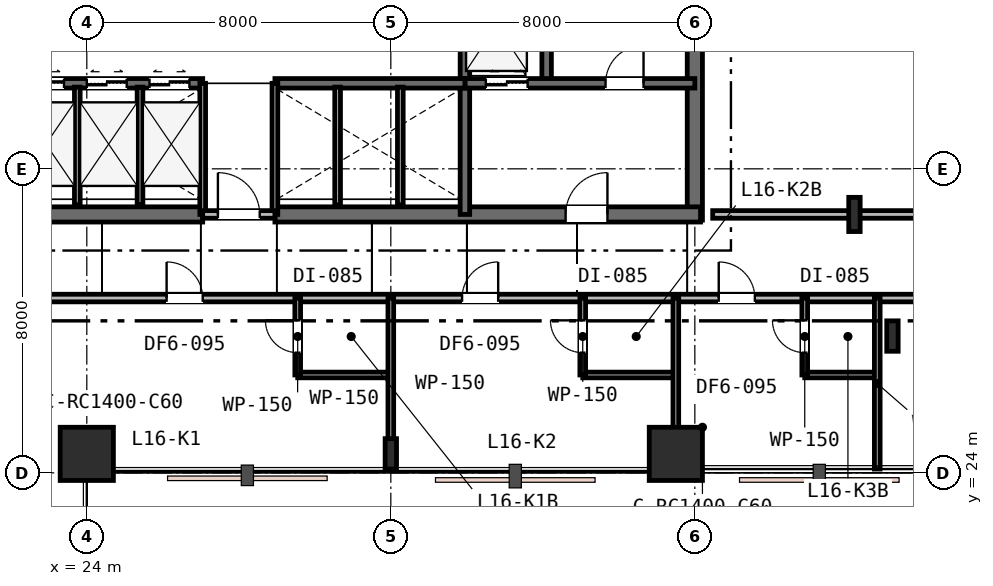
"""IFC4 building model, lengths in metres.
Left out: names, types, materials, properties, quantities, classifications, styles, units other than length and angle.
Written with IfcOpenShell. Run it as: python <this file> out.ifc"""

import sys

from ifc_helpers import new_model, si_unit, direction, frame, frame_2d, origin, origin_2d, place, context, subcontext, project, spatial, rectangle, i_section, extrude, element, fill, save


model = new_model("IFC4")
c1 = context("Model", 3, precision=1e-05, world=origin(), true_north=direction((0.0, 1.0)))
c2 = subcontext(c1, "Body", "Model", "MODEL_VIEW")
j1 = project(units=[si_unit("LENGTHUNIT", "METRE"), si_unit("PLANEANGLEUNIT", "RADIAN")], contexts=[c1])
p1 = place(None, origin())
s1 = spatial("IfcSite", under=j1, at=p1, CompositionType="ELEMENT")
p2 = place(p1, origin())
s2 = spatial("IfcBuilding", under=s1, at=p2, CompositionType="ELEMENT")
p3 = place(p2, frame((0.0, 0.0, 65.4)))
s3 = spatial("IfcBuildingStorey", under=s2, at=p3, CompositionType="ELEMENT", Elevation=65.4)
p4 = place(p3, frame((40.0, 30.65, 0.0), z_axis=(0.0, 0.0, 1.0), x_axis=(0.0, 1.0, 0.0)))
e1 = element("IfcWall", 1, at=p4, inside=s3, PredefinedType="SHEAR", context=c2, shape_type="SweptSolid", body=[
    extrude(rectangle(XDim=12.3, YDim=0.4, at=frame_2d((6.15, 0.0))), origin(), (0.0, 0.0, 1.0), 3.6),
])
p5 = place(p3, frame((15.85, 30.8, 0.0), z_axis=(0.0, 0.0, 1.0), x_axis=(1.0, 0.0, 0.0)))
e2 = element("IfcWall", 2, at=p5, inside=s3, PredefinedType="SHEAR", context=c2, shape_type="SweptSolid", body=[
    extrude(rectangle(XDim=11.2, YDim=0.4, at=frame_2d((5.6, 0.0))), origin(), (0.0, 0.0, 1.0), 3.6),
])
p6 = place(p5, frame((2.45, 0.0, 0.0)))
e3 = element("IfcOpeningElement", 3, at=p6, cuts=e2, PredefinedType="OPENING", context=c2, shape_type="SweptSolid", body=[
    extrude(rectangle(XDim=1.1, YDim=2.15, at=frame_2d((0.55, 1.075))), frame((0.0, 0.21, 0.0), z_axis=(0.0, -1.0, 0.0), x_axis=(1.0, 0.0, 0.0)), (0.0, 0.0, 1.0), 0.42),
])
p7 = place(p3, frame((28.95, 30.8, 0.0), z_axis=(0.0, 0.0, 1.0), x_axis=(1.0, 0.0, 0.0)))
e4 = element("IfcWall", 4, at=p7, inside=s3, PredefinedType="SHEAR", context=c2, shape_type="SweptSolid", body=[
    extrude(rectangle(XDim=11.2, YDim=0.4, at=frame_2d((5.6, 0.0))), origin(), (0.0, 0.0, 1.0), 3.6),
])
p8 = place(p7, frame((7.65, 0.0, 0.0)))
e5 = element("IfcOpeningElement", 5, at=p8, cuts=e4, PredefinedType="OPENING", context=c2, shape_type="SweptSolid", body=[
    extrude(rectangle(XDim=1.1, YDim=2.15, at=frame_2d((0.55, 1.075))), frame((0.0, 0.21, 0.0), z_axis=(0.0, -1.0, 0.0), x_axis=(1.0, 0.0, 0.0)), (0.0, 0.0, 1.0), 0.42),
])
p9 = place(p3, frame((36.1, 34.25, 0.0), z_axis=(0.0, 0.0, 1.0), x_axis=(0.0, 1.0, 0.0)))
e6 = element("IfcWall", 6, at=p9, inside=s3, PredefinedType="SHEAR", context=c2, shape_type="SweptSolid", body=[
    extrude(rectangle(XDim=8.65, YDim=0.25, at=frame_2d((4.325, 0.0))), origin(), (0.0, 0.0, 1.0), 3.6),
])
p10 = place(p3, frame((33.95, 30.8, 0.0), z_axis=(0.0, 0.0, 1.0), x_axis=(0.0, 1.0, 0.0)))
e7 = element("IfcWall", 7, at=p10, inside=s3, PredefinedType="SHEAR", context=c2, shape_type="SweptSolid", body=[
    extrude(rectangle(XDim=6.45, YDim=0.25, at=frame_2d((3.225, 0.0))), origin(), (0.0, 0.0, 1.0), 3.6),
])
p11 = place(p3, frame((33.95, 34.25, 0.0), z_axis=(0.0, 0.0, 1.0), x_axis=(1.0, 0.0, 0.0)))
e8 = element("IfcWall", 8, at=p11, inside=s3, PredefinedType="SHEAR", context=c2, shape_type="SweptSolid", body=[
    extrude(rectangle(XDim=6.05, YDim=0.25, at=frame_2d((3.025, 0.0))), origin(), (0.0, 0.0, 1.0), 3.6),
])
p12 = place(p11, frame((3.7, 0.0, 0.0)))
e9 = element("IfcOpeningElement", 9, at=p12, cuts=e8, PredefinedType="OPENING", context=c2, shape_type="SweptSolid", body=[
    extrude(rectangle(XDim=1.0, YDim=2.15, at=frame_2d((0.5, 1.075))), frame((0.0, 0.135, 0.0), z_axis=(0.0, -1.0, 0.0), x_axis=(1.0, 0.0, 0.0)), (0.0, 0.0, 1.0), 0.27),
])
p13 = place(p11, frame((0.55, 0.0, 0.0)))
e10 = element("IfcOpeningElement", 10, at=p13, cuts=e8, PredefinedType="OPENING", context=c2, shape_type="SweptSolid", body=[
    extrude(rectangle(XDim=1.1, YDim=2.15, at=frame_2d((0.55, 1.075))), frame((0.0, 0.135, 0.0), z_axis=(0.0, -1.0, 0.0), x_axis=(1.0, 0.0, 0.0)), (0.0, 0.0, 1.0), 0.27),
])
p14 = place(p3, frame((22.05, 34.25, 0.0), z_axis=(0.0, 0.0, 1.0), x_axis=(1.0, 0.0, 0.0)))
e11 = element("IfcWall", 11, at=p14, inside=s3, PredefinedType="SHEAR", context=c2, shape_type="SweptSolid", body=[
    extrude(rectangle(XDim=5.0, YDim=0.25, at=frame_2d((2.5, 0.0))), origin(), (0.0, 0.0, 1.0), 3.6),
])
p15 = place(p14, frame((0.3, 0.0, 0.0)))
e12 = element("IfcOpeningElement", 12, at=p15, cuts=e11, PredefinedType="OPENING", context=c2, shape_type="SweptSolid", body=[
    extrude(rectangle(XDim=1.05, YDim=2.15, at=frame_2d((0.525, 1.075))), frame((0.0, 0.135, 0.0), z_axis=(0.0, -1.0, 0.0), x_axis=(1.0, 0.0, 0.0)), (0.0, 0.0, 1.0), 0.27),
])
p16 = place(p14, frame((1.95, 0.0, 0.0)))
e13 = element("IfcOpeningElement", 13, at=p16, cuts=e11, PredefinedType="OPENING", context=c2, shape_type="SweptSolid", body=[
    extrude(rectangle(XDim=1.05, YDim=2.15, at=frame_2d((0.525, 1.075))), frame((0.0, 0.135, 0.0), z_axis=(0.0, -1.0, 0.0), x_axis=(1.0, 0.0, 0.0)), (0.0, 0.0, 1.0), 0.27),
])
p17 = place(p14, frame((3.6, 0.0, 0.0)))
e14 = element("IfcOpeningElement", 14, at=p17, cuts=e11, PredefinedType="OPENING", context=c2, shape_type="SweptSolid", body=[
    extrude(rectangle(XDim=1.05, YDim=2.15, at=frame_2d((0.525, 1.075))), frame((0.0, 0.135, 0.0), z_axis=(0.0, -1.0, 0.0), x_axis=(1.0, 0.0, 0.0)), (0.0, 0.0, 1.0), 0.27),
])
p18 = place(p3, frame((28.95, 34.25, 0.0), z_axis=(0.0, 0.0, 1.0), x_axis=(1.0, 0.0, 0.0)))
e15 = element("IfcWall", 15, at=p18, inside=s3, PredefinedType="SHEAR", context=c2, shape_type="SweptSolid", body=[
    extrude(rectangle(XDim=5.0, YDim=0.25, at=frame_2d((2.5, 0.0))), origin(), (0.0, 0.0, 1.0), 3.6),
])
p19 = place(p3, frame((24.0, 24.5, 0.0), z_axis=(0.0, 0.0, 1.0), x_axis=(1.0, 0.0, 0.0)))
e16 = element("IfcColumn", 16, at=p19, inside=s3, PredefinedType="COLUMN", context=c2, shape_type="SweptSolid", body=[
    extrude(rectangle(XDim=1.4, YDim=1.4, at=origin_2d()), origin(), (0.0, 0.0, 1.0), 3.6),
])
p20 = place(p3, frame((32.0, 24.5, 0.0), z_axis=(0.0, 0.0, 1.0), x_axis=(1.0, 0.0, 0.0)))
e17 = element("IfcColumn", 17, at=p20, inside=s3, PredefinedType="COLUMN", context=c2, shape_type="SweptSolid", body=[
    extrude(i_section(OverallWidth=0.3, OverallDepth=0.8, WebThickness=0.018, FlangeThickness=0.033, FilletRadius=0.03, at=origin_2d()), origin(), (0.0, 0.0, 1.0), 3.6),
])
p21 = place(p3, frame((39.5, 24.5, 0.0), z_axis=(0.0, 0.0, 1.0), x_axis=(1.0, 0.0, 0.0)))
e18 = element("IfcColumn", 18, at=p21, inside=s3, PredefinedType="COLUMN", context=c2, shape_type="SweptSolid", body=[
    extrude(rectangle(XDim=1.4, YDim=1.4, at=origin_2d()), origin(), (0.0, 0.0, 1.0), 3.6),
])
p22 = place(p3, frame((45.2, 27.6, 0.0), z_axis=(0.0, 0.0, 1.0), x_axis=(1.0, 0.0, 0.0)))
e19 = element("IfcColumn", 19, at=p22, inside=s3, PredefinedType="COLUMN", context=c2, shape_type="SweptSolid", body=[
    extrude(i_section(OverallWidth=0.3, OverallDepth=0.8, WebThickness=0.018, FlangeThickness=0.033, FilletRadius=0.03, at=origin_2d()), origin(), (0.0, 0.0, 1.0), 3.6),
])
p23 = place(p3, frame((44.2, 30.8, 0.0), z_axis=(0.0, 0.0, 1.0), x_axis=(1.0, 0.0, 0.0)))
e20 = element("IfcColumn", 20, at=p23, inside=s3, PredefinedType="COLUMN", context=c2, shape_type="SweptSolid", body=[
    extrude(i_section(OverallWidth=0.3, OverallDepth=0.9, WebThickness=0.018, FlangeThickness=0.035, FilletRadius=0.03, at=origin_2d()), origin(), (0.0, 0.0, 1.0), 3.6),
])
for number, where, z_axis, x_axis in (
    (21, (27.05, 30.8, 0.0), (0.0, 0.0, 1.0), (0.0, 1.0, 0.0)),
    (22, (28.95, 30.8, 0.0), (0.0, 0.0, 1.0), (0.0, 1.0, 0.0)),
):
    element("IfcWall", number, at=place(p3, frame(where, z_axis=z_axis, x_axis=x_axis)), inside=s3, PredefinedType="PLUMBINGWALL", context=c2, shape_type="SweptSolid", body=[
        extrude(rectangle(XDim=3.45, YDim=0.15, at=frame_2d((1.725, 0.0))), origin(), (0.0, 0.0, 1.0), 3.33),
    ])
p24 = place(p3, frame((27.05, 30.8, 0.0), z_axis=(0.0, 0.0, 1.0), x_axis=(1.0, 0.0, 0.0)))
e23 = element("IfcWall", 23, at=p24, inside=s3, PredefinedType="PARTITIONING", context=c2, shape_type="SweptSolid", body=[
    extrude(rectangle(XDim=1.9, YDim=0.2, at=frame_2d((0.95, 0.0))), origin(), (0.0, 0.0, 1.0), 3.33),
])
p25 = place(p24, frame((0.4, 0.0, 0.0)))
e24 = element("IfcOpeningElement", 24, at=p25, cuts=e23, PredefinedType="OPENING", context=c2, shape_type="SweptSolid", body=[
    extrude(rectangle(XDim=1.1, YDim=2.15, at=frame_2d((0.55, 1.075))), frame((0.0, 0.11, 0.0), z_axis=(0.0, -1.0, 0.0), x_axis=(1.0, 0.0, 0.0)), (0.0, 0.0, 1.0), 0.22),
])
for number, where, z_axis, x_axis in (
    (25, (23.75, 31.05, 0.0), (0.0, 0.0, 1.0), (0.0, 1.0, 0.0)),
    (26, (25.4, 31.05, 0.0), (0.0, 0.0, 1.0), (0.0, 1.0, 0.0)),
    (27, (30.6, 31.05, 0.0), (0.0, 0.0, 1.0), (0.0, 1.0, 0.0)),
    (28, (32.25, 31.05, 0.0), (0.0, 0.0, 1.0), (0.0, 1.0, 0.0)),
):
    element("IfcWall", number, at=place(p3, frame(where, z_axis=z_axis, x_axis=x_axis)), inside=s3, PredefinedType="PLUMBINGWALL", context=c2, shape_type="SweptSolid", body=[
        extrude(rectangle(XDim=3.1, YDim=0.15, at=frame_2d((1.55, 0.0))), origin(), (0.0, 0.0, 1.0), 3.33),
    ])
p26 = place(p3, frame((11.8, 28.6, 0.0), z_axis=(0.0, 0.0, 1.0), x_axis=(1.0, 0.0, 0.0)))
e29 = element("IfcWall", 29, at=p26, inside=s3, PredefinedType="PARTITIONING", context=c2, shape_type="SweptSolid", body=[
    extrude(rectangle(XDim=38.6, YDim=0.2, at=frame_2d((19.3, 0.0))), origin(), (0.0, 0.0, 1.0), 2.83),
])
p27 = place(p26, frame((14.3, 0.0, 0.0)))
e30 = element("IfcOpeningElement", 30, at=p27, cuts=e29, PredefinedType="OPENING", context=c2, shape_type="SweptSolid", body=[
    extrude(rectangle(XDim=0.95, YDim=2.15, at=frame_2d((0.475, 1.075))), frame((0.0, 0.11, 0.0), z_axis=(0.0, -1.0, 0.0), x_axis=(1.0, 0.0, 0.0)), (0.0, 0.0, 1.0), 0.22),
])
p28 = place(p26, frame((22.075, 0.0, 0.0)))
e31 = element("IfcOpeningElement", 31, at=p28, cuts=e29, PredefinedType="OPENING", context=c2, shape_type="SweptSolid", body=[
    extrude(rectangle(XDim=0.95, YDim=2.15, at=frame_2d((0.475, 1.075))), frame((0.0, 0.11, 0.0), z_axis=(0.0, -1.0, 0.0), x_axis=(1.0, 0.0, 0.0)), (0.0, 0.0, 1.0), 0.22),
])
p29 = place(p26, frame((28.829, 0.0, 0.0)))
e32 = element("IfcOpeningElement", 32, at=p29, cuts=e29, PredefinedType="OPENING", context=c2, shape_type="SweptSolid", body=[
    extrude(rectangle(XDim=0.95, YDim=2.15, at=frame_2d((0.475, 1.075))), frame((0.0, 0.11, 0.0), z_axis=(0.0, -1.0, 0.0), x_axis=(1.0, 0.0, 0.0)), (0.0, 0.0, 1.0), 0.22),
])
p30 = place(p26, frame((34.669, 0.0, 0.0)))
e33 = element("IfcOpeningElement", 33, at=p30, cuts=e29, PredefinedType="OPENING", context=c2, shape_type="SweptSolid", body=[
    extrude(rectangle(XDim=0.95, YDim=2.15, at=frame_2d((0.475, 1.075))), frame((0.0, 0.11, 0.0), z_axis=(0.0, -1.0, 0.0), x_axis=(1.0, 0.0, 0.0)), (0.0, 0.0, 1.0), 0.22),
])
p31 = place(p3, frame((29.55, 26.576, 0.0), z_axis=(0.0, 0.0, 1.0), x_axis=(1.0, 0.0, 0.0)))
e34 = element("IfcWall", 34, at=p31, inside=s3, PredefinedType="PARTITIONING", context=c2, shape_type="SweptSolid", body=[
    extrude(rectangle(XDim=2.45, YDim=0.15, at=frame_2d((1.225, 0.0))), origin(), (0.0, 0.0, 1.0), 3.33),
])
p32 = place(p3, frame((29.55, 26.576, 0.0), z_axis=(0.0, 0.0, 1.0), x_axis=(0.0, 1.0, 0.0)))
e35 = element("IfcWall", 35, at=p32, inside=s3, PredefinedType="PARTITIONING", context=c2, shape_type="SweptSolid", body=[
    extrude(rectangle(XDim=2.024, YDim=0.15, at=frame_2d((1.012, 0.0))), origin(), (0.0, 0.0, 1.0), 3.33),
])
p33 = place(p32, frame((0.587, 0.0, 0.0)))
e36 = element("IfcOpeningElement", 36, at=p33, cuts=e35, PredefinedType="OPENING", context=c2, shape_type="SweptSolid", body=[
    extrude(rectangle(XDim=0.85, YDim=2.15, at=frame_2d((0.425, 1.075))), frame((0.0, 0.085, 0.0), z_axis=(0.0, -1.0, 0.0), x_axis=(1.0, 0.0, 0.0)), (0.0, 0.0, 1.0), 0.17),
])
p34 = place(p3, frame((32.0, 28.6, 0.0), z_axis=(0.0, 0.0, 1.0), x_axis=(0.0, -1.0, 0.0)))
e37 = element("IfcWall", 37, at=p34, inside=s3, PredefinedType="PARTITIONING", context=c2, shape_type="SweptSolid", body=[
    extrude(rectangle(XDim=4.5, YDim=0.15, at=frame_2d((2.25, 0.0))), origin(), (0.0, 0.0, 1.0), 2.92),
])
p35 = place(p3, frame((37.05, 26.576, 0.0), z_axis=(0.0, 0.0, 1.0), x_axis=(1.0, 0.0, 0.0)))
e38 = element("IfcWall", 38, at=p35, inside=s3, PredefinedType="PARTITIONING", context=c2, shape_type="SweptSolid", body=[
    extrude(rectangle(XDim=2.45, YDim=0.15, at=frame_2d((1.225, 0.0))), origin(), (0.0, 0.0, 1.0), 2.83),
])
p36 = place(p3, frame((37.05, 26.576, 0.0), z_axis=(0.0, 0.0, 1.0), x_axis=(0.0, 1.0, 0.0)))
e39 = element("IfcWall", 39, at=p36, inside=s3, PredefinedType="PARTITIONING", context=c2, shape_type="SweptSolid", body=[
    extrude(rectangle(XDim=2.024, YDim=0.15, at=frame_2d((1.012, 0.0))), origin(), (0.0, 0.0, 1.0), 3.02),
])
p37 = place(p36, frame((0.587, 0.0, 0.0)))
e40 = element("IfcOpeningElement", 40, at=p37, cuts=e39, PredefinedType="OPENING", context=c2, shape_type="SweptSolid", body=[
    extrude(rectangle(XDim=0.85, YDim=2.15, at=frame_2d((0.425, 1.075))), frame((0.0, 0.085, 0.0), z_axis=(0.0, -1.0, 0.0), x_axis=(1.0, 0.0, 0.0)), (0.0, 0.0, 1.0), 0.17),
])
p38 = place(p3, frame((39.5, 28.6, 0.0), z_axis=(0.0, 0.0, 1.0), x_axis=(0.0, -1.0, 0.0)))
e41 = element("IfcWall", 41, at=p38, inside=s3, PredefinedType="PARTITIONING", context=c2, shape_type="SweptSolid", body=[
    extrude(rectangle(XDim=4.5, YDim=0.15, at=frame_2d((2.25, 0.0))), origin(), (0.0, 0.0, 1.0), 2.83),
])
p39 = place(p3, frame((42.892, 26.576, 0.0), z_axis=(0.0, 0.0, 1.0), x_axis=(1.0, 0.0, 0.0)))
e42 = element("IfcWall", 42, at=p39, inside=s3, PredefinedType="PARTITIONING", context=c2, shape_type="SweptSolid", body=[
    extrude(rectangle(XDim=1.908, YDim=0.15, at=frame_2d((0.954, 0.0))), origin(), (0.0, 0.0, 1.0), 3.33),
])
p40 = place(p3, frame((42.892, 26.576, 0.0), z_axis=(0.0, 0.0, 1.0), x_axis=(0.0, 1.0, 0.0)))
e43 = element("IfcWall", 43, at=p40, inside=s3, PredefinedType="PARTITIONING", context=c2, shape_type="SweptSolid", body=[
    extrude(rectangle(XDim=2.024, YDim=0.15, at=frame_2d((1.012, 0.0))), origin(), (0.0, 0.0, 1.0), 3.33),
])
p41 = place(p40, frame((0.587, 0.0, 0.0)))
e44 = element("IfcOpeningElement", 44, at=p41, cuts=e43, PredefinedType="OPENING", context=c2, shape_type="SweptSolid", body=[
    extrude(rectangle(XDim=0.85, YDim=2.15, at=frame_2d((0.425, 1.075))), frame((0.0, 0.085, 0.0), z_axis=(0.0, -1.0, 0.0), x_axis=(1.0, 0.0, 0.0)), (0.0, 0.0, 1.0), 0.17),
])
p42 = place(p3, frame((44.8, 28.6, 0.0), z_axis=(0.0, 0.0, 1.0), x_axis=(0.0, -1.0, 0.0)))
e45 = element("IfcWall", 45, at=p42, inside=s3, PredefinedType="PARTITIONING", context=c2, shape_type="SweptSolid", body=[
    extrude(rectangle(XDim=4.5, YDim=0.15, at=frame_2d((2.25, 0.0))), origin(), (0.0, 0.0, 1.0), 2.83),
])
p43 = place(p3, frame((40.47, 30.8, 0.0), z_axis=(0.0, 0.0, 1.0), x_axis=(1.0, 0.0, 0.0)))
e46 = element("IfcWall", 46, at=p43, inside=s3, PredefinedType="PARTITIONING", context=c2, shape_type="SweptSolid", body=[
    extrude(rectangle(XDim=15.43, YDim=0.2, at=frame_2d((7.715, 0.0))), origin(), (0.0, 0.0, 1.0), 2.83),
])
p44 = place(p43, frame((6.673, 0.0, 0.0)))
e47 = element("IfcOpeningElement", 47, at=p44, cuts=e46, PredefinedType="OPENING", context=c2, shape_type="SweptSolid", body=[
    extrude(rectangle(XDim=0.95, YDim=2.15, at=frame_2d((0.475, 1.075))), frame((0.0, 0.11, 0.0), z_axis=(0.0, -1.0, 0.0), x_axis=(1.0, 0.0, 0.0)), (0.0, 0.0, 1.0), 0.22),
])
p45 = place(p25, origin())
e48 = element("IfcDoor", 48, at=p45, inside=s3, OperationType="SINGLE_SWING_LEFT", PredefinedType="DOOR", context=c2, shape_type="SweptSolid", body=[
    extrude(rectangle(XDim=1.1, YDim=2.15, at=frame_2d((0.55, 1.075))), frame((0.0, 0.025, 0.0), z_axis=(0.0, -1.0, 0.0), x_axis=(1.0, 0.0, 0.0)), (0.0, 0.0, 1.0), 0.05),
])
fill(e24, e48)
p46 = place(p12, origin())
e49 = element("IfcDoor", 49, at=p46, inside=s3, OperationType="SINGLE_SWING_RIGHT", PredefinedType="DOOR", context=c2, shape_type="SweptSolid", body=[
    extrude(rectangle(XDim=1.0, YDim=2.15, at=frame_2d((0.5, 1.075))), frame((0.0, 0.025, 0.0), z_axis=(0.0, -1.0, 0.0), x_axis=(1.0, 0.0, 0.0)), (0.0, 0.0, 1.0), 0.05),
])
fill(e9, e49)
p47 = place(p8, origin())
e50 = element("IfcDoor", 50, at=p47, inside=s3, OperationType="SINGLE_SWING_RIGHT", PredefinedType="DOOR", context=c2, shape_type="SweptSolid", body=[
    extrude(rectangle(XDim=1.1, YDim=2.15, at=frame_2d((0.55, 1.075))), frame((0.0, 0.025, 0.0), z_axis=(0.0, -1.0, 0.0), x_axis=(1.0, 0.0, 0.0)), (0.0, 0.0, 1.0), 0.05),
])
fill(e5, e50)
p48 = place(p27, origin())
e51 = element("IfcDoor", 51, at=p48, inside=s3, OperationType="SINGLE_SWING_LEFT", PredefinedType="DOOR", context=c2, shape_type="SweptSolid", body=[
    extrude(rectangle(XDim=0.95, YDim=2.15, at=frame_2d((0.475, 1.075))), frame((0.0, 0.025, 0.0), z_axis=(0.0, -1.0, 0.0), x_axis=(1.0, 0.0, 0.0)), (0.0, 0.0, 1.0), 0.05),
])
fill(e30, e51)
p49 = place(p33, origin())
e52 = element("IfcDoor", 52, at=p49, inside=s3, OperationType="SINGLE_SWING_RIGHT", PredefinedType="DOOR", context=c2, shape_type="SweptSolid", body=[
    extrude(rectangle(XDim=0.85, YDim=2.15, at=frame_2d((0.425, 1.075))), frame((0.0, 0.025, 0.0), z_axis=(0.0, -1.0, 0.0), x_axis=(1.0, 0.0, 0.0)), (0.0, 0.0, 1.0), 0.05),
])
fill(e36, e52)
p50 = place(p28, origin())
e53 = element("IfcDoor", 53, at=p50, inside=s3, OperationType="SINGLE_SWING_RIGHT", PredefinedType="DOOR", context=c2, shape_type="SweptSolid", body=[
    extrude(rectangle(XDim=0.95, YDim=2.15, at=frame_2d((0.475, 1.075))), frame((0.0, 0.025, 0.0), z_axis=(0.0, -1.0, 0.0), x_axis=(1.0, 0.0, 0.0)), (0.0, 0.0, 1.0), 0.05),
])
fill(e31, e53)
p51 = place(p37, origin())
e54 = element("IfcDoor", 54, at=p51, inside=s3, OperationType="SINGLE_SWING_RIGHT", PredefinedType="DOOR", context=c2, shape_type="SweptSolid", body=[
    extrude(rectangle(XDim=0.85, YDim=2.15, at=frame_2d((0.425, 1.075))), frame((0.0, 0.025, 0.0), z_axis=(0.0, -1.0, 0.0), x_axis=(1.0, 0.0, 0.0)), (0.0, 0.0, 1.0), 0.05),
])
fill(e40, e54)
p52 = place(p29, origin())
e55 = element("IfcDoor", 55, at=p52, inside=s3, OperationType="SINGLE_SWING_LEFT", PredefinedType="DOOR", context=c2, shape_type="SweptSolid", body=[
    extrude(rectangle(XDim=0.95, YDim=2.15, at=frame_2d((0.475, 1.075))), frame((0.0, 0.025, 0.0), z_axis=(0.0, -1.0, 0.0), x_axis=(1.0, 0.0, 0.0)), (0.0, 0.0, 1.0), 0.05),
])
fill(e32, e55)
p53 = place(p41, origin())
e56 = element("IfcDoor", 56, at=p53, inside=s3, OperationType="SINGLE_SWING_RIGHT", PredefinedType="DOOR", context=c2, shape_type="SweptSolid", body=[
    extrude(rectangle(XDim=0.85, YDim=2.15, at=frame_2d((0.425, 1.075))), frame((0.0, 0.025, 0.0), z_axis=(0.0, -1.0, 0.0), x_axis=(1.0, 0.0, 0.0)), (0.0, 0.0, 1.0), 0.05),
])
fill(e44, e56)
p54 = place(p13, origin())
e57 = element("IfcDoor", 57, at=p54, inside=s3, OperationType="DOUBLE_DOOR_SLIDING", PredefinedType="DOOR", context=c2, shape_type="SweptSolid", body=[
    extrude(rectangle(XDim=1.1, YDim=2.15, at=frame_2d((0.55, 1.075))), frame((0.0, 0.025, 0.0), z_axis=(0.0, -1.0, 0.0), x_axis=(1.0, 0.0, 0.0)), (0.0, 0.0, 1.0), 0.05),
])
fill(e10, e57)
p55 = place(p15, origin())
e58 = element("IfcDoor", 58, at=p55, inside=s3, OperationType="DOUBLE_DOOR_SLIDING", PredefinedType="DOOR", context=c2, shape_type="SweptSolid", body=[
    extrude(rectangle(XDim=1.05, YDim=2.15, at=frame_2d((0.525, 1.075))), frame((0.0, 0.025, 0.0), z_axis=(0.0, -1.0, 0.0), x_axis=(1.0, 0.0, 0.0)), (0.0, 0.0, 1.0), 0.05),
])
fill(e12, e58)
p56 = place(p16, origin())
e59 = element("IfcDoor", 59, at=p56, inside=s3, OperationType="DOUBLE_DOOR_SLIDING", PredefinedType="DOOR", context=c2, shape_type="SweptSolid", body=[
    extrude(rectangle(XDim=1.05, YDim=2.15, at=frame_2d((0.525, 1.075))), frame((0.0, 0.025, 0.0), z_axis=(0.0, -1.0, 0.0), x_axis=(1.0, 0.0, 0.0)), (0.0, 0.0, 1.0), 0.05),
])
fill(e13, e59)
p57 = place(p17, origin())
e60 = element("IfcDoor", 60, at=p57, inside=s3, OperationType="DOUBLE_DOOR_SLIDING", PredefinedType="DOOR", context=c2, shape_type="SweptSolid", body=[
    extrude(rectangle(XDim=1.05, YDim=2.15, at=frame_2d((0.525, 1.075))), frame((0.0, 0.025, 0.0), z_axis=(0.0, -1.0, 0.0), x_axis=(1.0, 0.0, 0.0)), (0.0, 0.0, 1.0), 0.05),
])
fill(e14, e60)
save(model, sys.argv[1])
